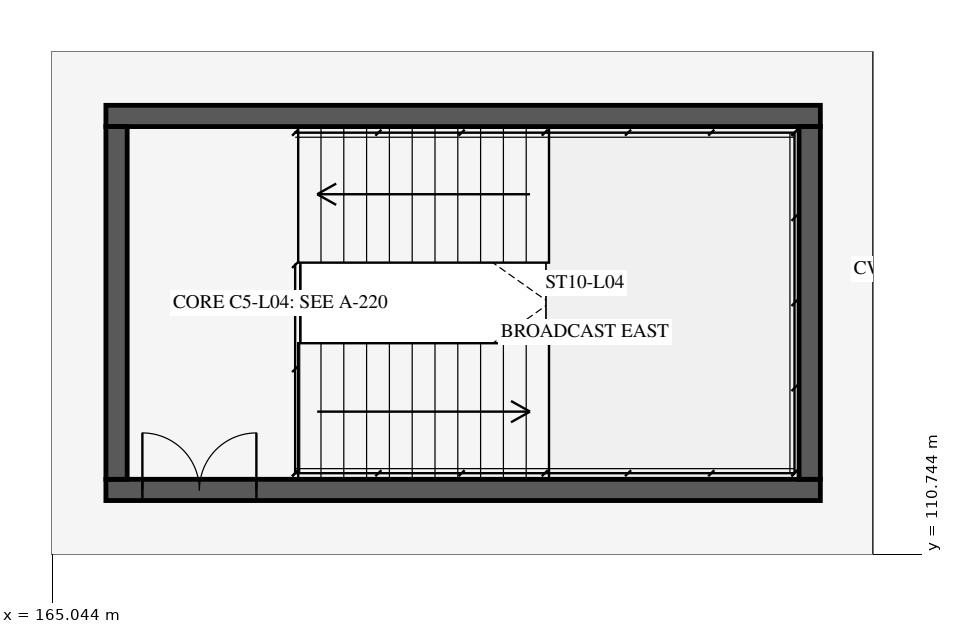
"""IFC4 building model, lengths in metres.
Left out: names, types, materials, properties, quantities, classifications, styles, units other than length and angle.
Written with IfcOpenShell. Run it as: python <this file> out.ifc"""

import sys

from ifc_helpers import new_model, si_unit, direction, frame, frame_2d, origin, place, context, subcontext, project, spatial, rectangle, extrude, element, fill, save


model = new_model("IFC4")
c1 = context("Model", 3, precision=1e-05, world=origin(), true_north=direction((0.0, 1.0)))
c2 = subcontext(c1, "Body", "Model", "MODEL_VIEW")
j1 = project(units=[si_unit("LENGTHUNIT", "METRE"), si_unit("PLANEANGLEUNIT", "RADIAN")], contexts=[c1])
p1 = place(None, origin())
s1 = spatial("IfcSite", under=j1, at=p1, CompositionType="ELEMENT")
p2 = place(p1, origin())
s2 = spatial("IfcBuilding", under=s1, at=p2, CompositionType="ELEMENT")
p3 = place(p2, frame((0.0, 0.0, 19.0)))
s3 = spatial("IfcBuildingStorey", under=s2, at=p3, CompositionType="ELEMENT", Elevation=19.0)
p4 = place(p3, frame((165.75, 111.59, 0.0), z_axis=(0.0, 0.0, 1.0), x_axis=(1.0, 0.0, 0.0)))
e1 = element("IfcWall", 1, at=p4, inside=s3, PredefinedType="SHEAR", context=c2, shape_type="SweptSolid", body=[
    extrude(rectangle(XDim=9.4, YDim=0.28, at=frame_2d((4.7, 0.0))), origin(), (0.0, 0.0, 1.0), 3.85),
])
p5 = place(p4, frame((0.48, 0.0, 0.0)))
e2 = element("IfcOpeningElement", 2, at=p5, cuts=e1, PredefinedType="OPENING", context=c2, shape_type="SweptSolid", body=[
    extrude(rectangle(XDim=1.5, YDim=2.3, at=frame_2d((0.75, 1.15))), frame((0.0, 0.152, 0.0), z_axis=(0.0, -1.0, 0.0), x_axis=(1.0, 0.0, 0.0)), (0.0, 0.0, 1.0), 0.304),
])
p6 = place(p3, frame((165.75, 116.51, 0.0), z_axis=(0.0, 0.0, 1.0), x_axis=(1.0, 0.0, 0.0)))
e3 = element("IfcWall", 3, at=p6, inside=s3, PredefinedType="SHEAR", context=c2, shape_type="SweptSolid", body=[
    extrude(rectangle(XDim=9.4, YDim=0.28, at=frame_2d((4.7, 0.0))), origin(), (0.0, 0.0, 1.0), 3.85),
])
for number, where, z_axis, x_axis in (
    (4, (165.89, 111.73, 0.0), (0.0, 0.0, 1.0), (0.0, 1.0, 0.0)),
    (5, (175.01, 111.73, 0.0), (0.0, 0.0, 1.0), (0.0, 1.0, 0.0)),
):
    element("IfcWall", number, at=place(p3, frame(where, z_axis=z_axis, x_axis=x_axis)), inside=s3, PredefinedType="SHEAR", context=c2, shape_type="SweptSolid", body=[
        extrude(rectangle(XDim=4.64, YDim=0.28, at=frame_2d((2.32, 0.0))), origin(), (0.0, 0.0, 1.0), 3.85),
    ])
p7 = place(p5, origin())
e6 = element("IfcDoor", 6, at=p7, inside=s3, OperationType="DOUBLE_DOOR_SINGLE_SWING", PredefinedType="DOOR", context=c2, shape_type="SweptSolid", body=[
    extrude(rectangle(XDim=1.5, YDim=2.3, at=frame_2d((0.75, 1.15))), frame((0.0, 0.025, 0.0), z_axis=(0.0, -1.0, 0.0), x_axis=(1.0, 0.0, 0.0)), (0.0, 0.0, 1.0), 0.05),
])
fill(e2, e6)
save(model, sys.argv[1])
